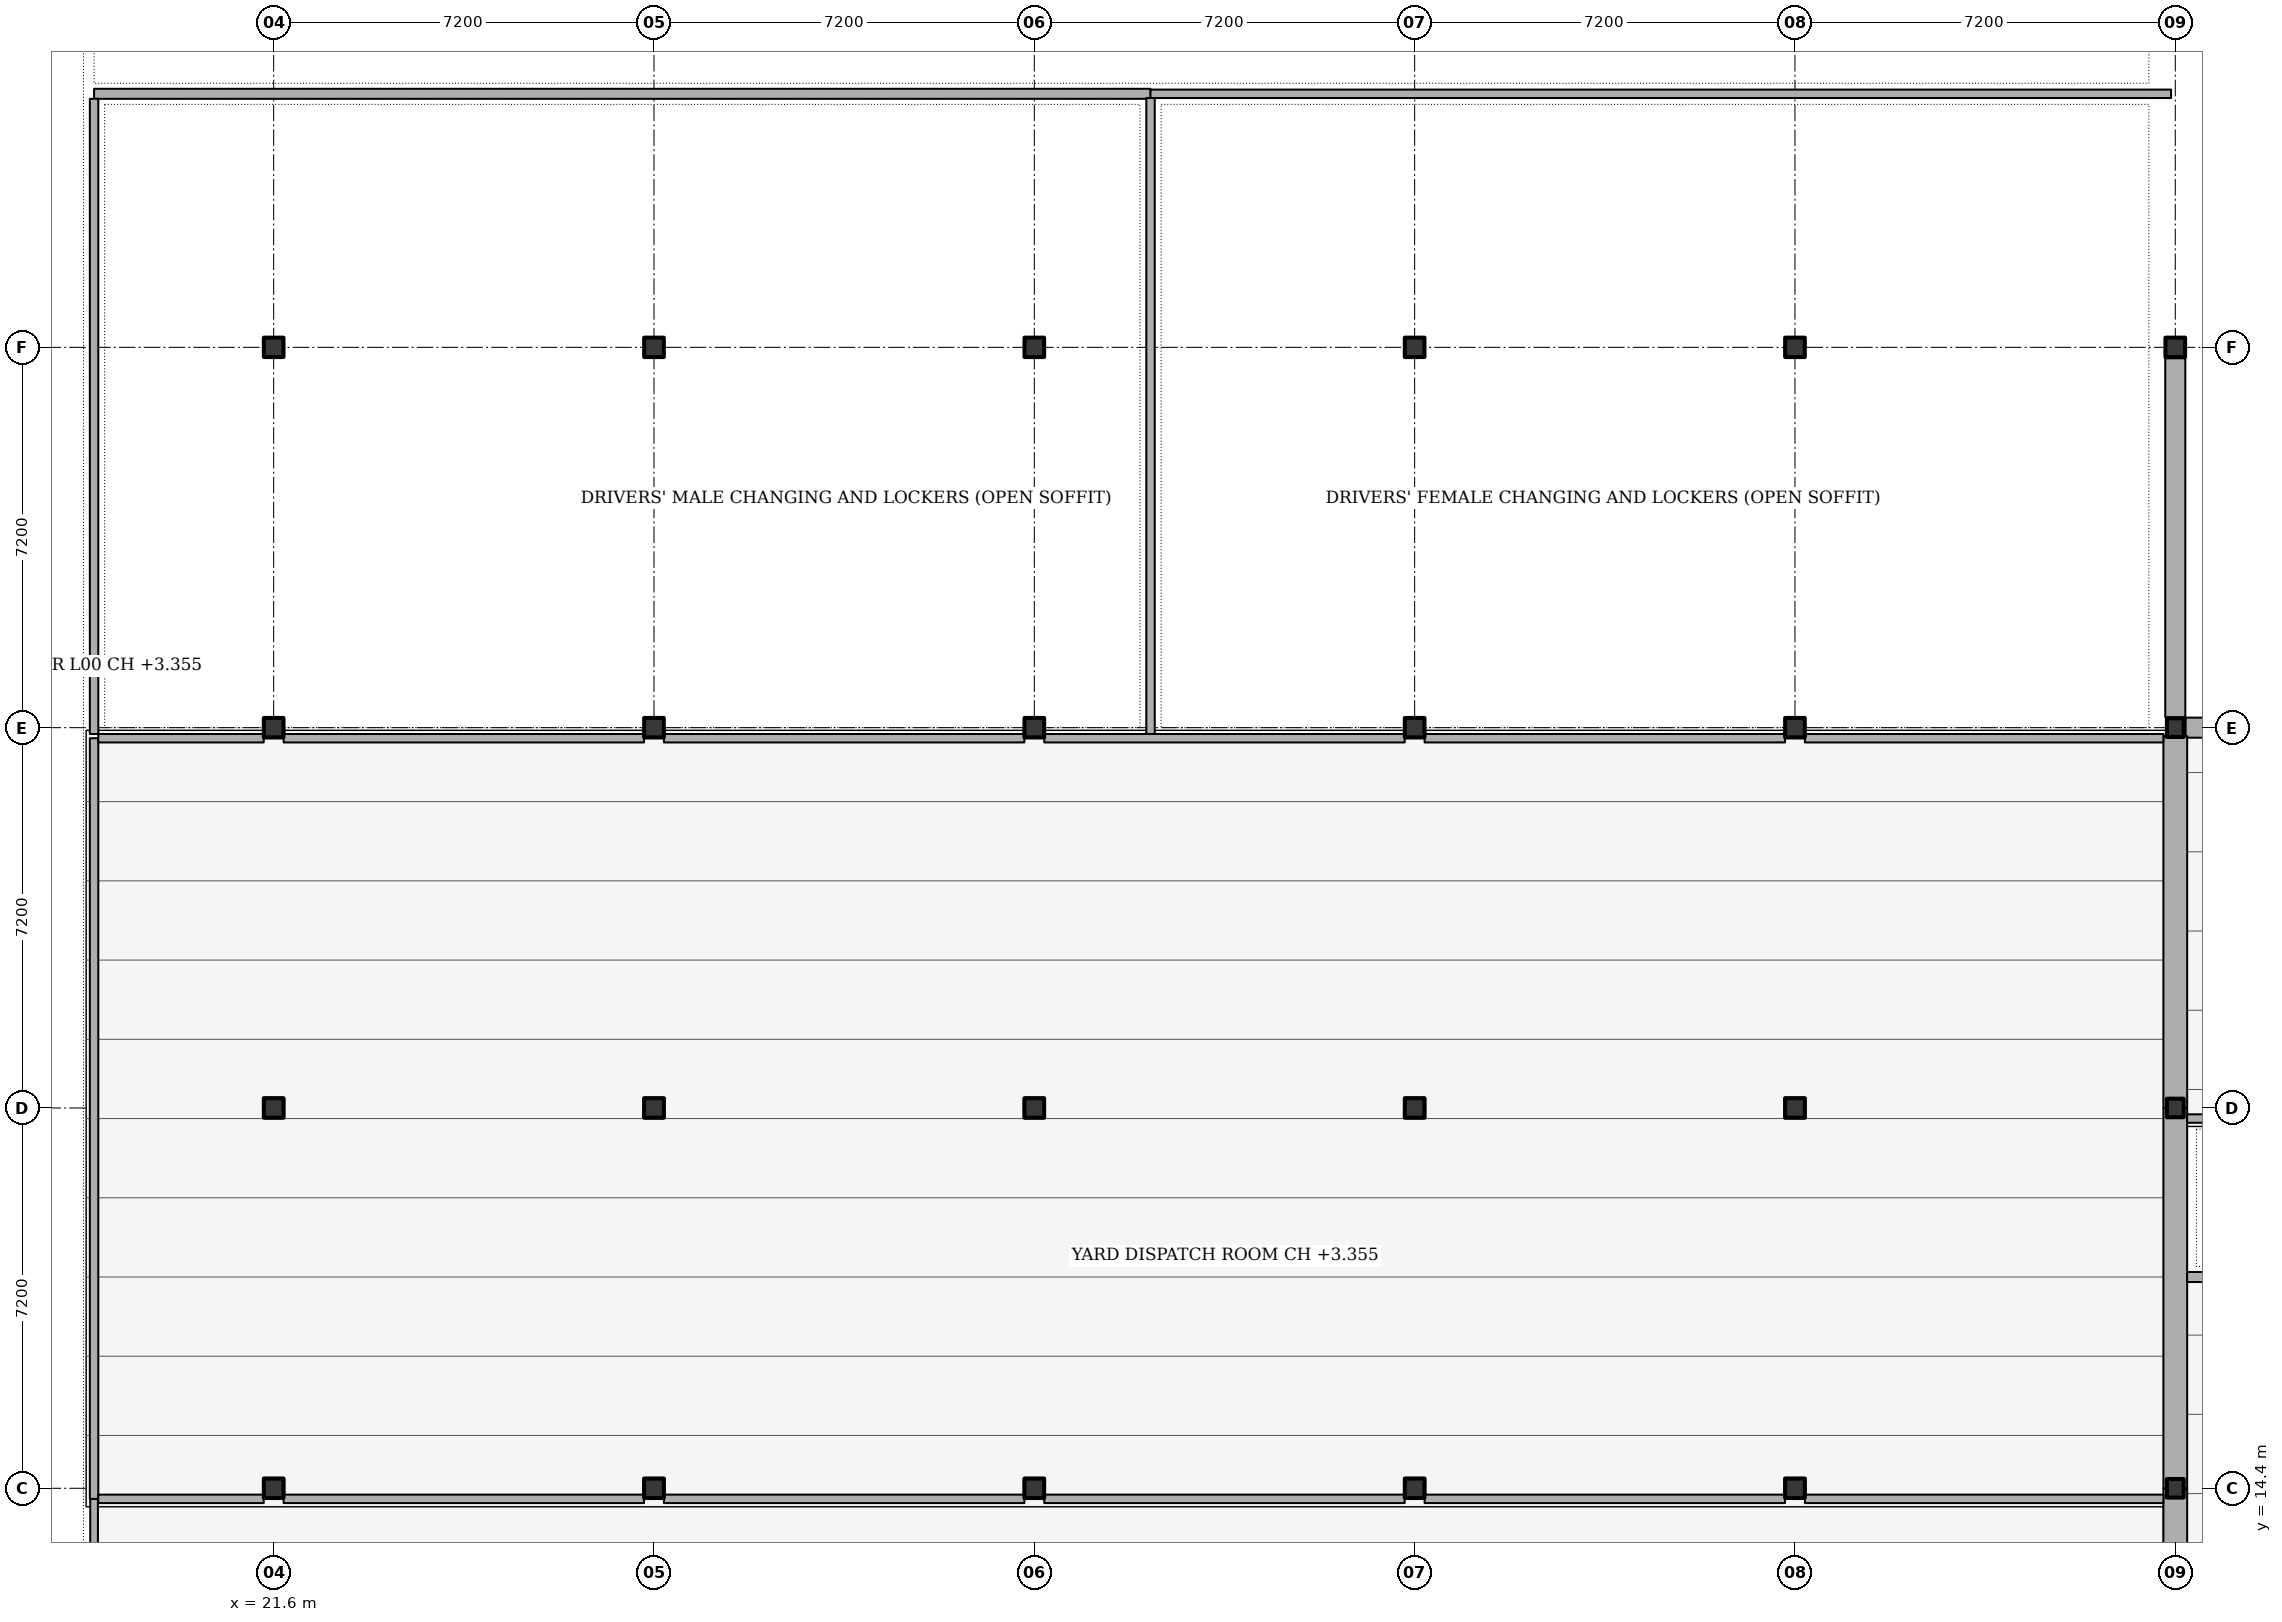
"""IFC4 building model, lengths in metres.
Left out: names, types, materials, properties, quantities, classifications, styles, units other than length and angle.
Written with IfcOpenShell. Run it as: python <this file> out.ifc"""

import sys

from ifc_helpers import new_model, si_unit, direction, frame, frame_2d, origin, origin_2d, place, context, subcontext, project, spatial, rectangle, i_section, extrude, element, fill, save


model = new_model("IFC4")
c1 = context("Model", 3, precision=1e-05, world=origin(), true_north=direction((0.0, 1.0)))
c2 = subcontext(c1, "Body", "Model", "MODEL_VIEW")
j1 = project(units=[si_unit("LENGTHUNIT", "METRE"), si_unit("PLANEANGLEUNIT", "RADIAN")], contexts=[c1])
p1 = place(None, origin())
s1 = spatial("IfcSite", under=j1, at=p1, CompositionType="ELEMENT")
p2 = place(p1, origin())
s2 = spatial("IfcBuilding", under=s1, at=p2, CompositionType="ELEMENT")
p3 = place(p2, origin())
s3 = spatial("IfcBuildingStorey", under=s2, at=p3, CompositionType="ELEMENT", Elevation=0.0)
for number, where, z_axis, x_axis in (
    (1, (21.6, 14.4, -0.3), (0.0, 0.0, 1.0), (1.0, 0.0, 0.0)),
    (2, (21.6, 21.6, -0.3), (0.0, 0.0, 1.0), (1.0, 0.0, 0.0)),
    (3, (21.6, 28.8, -0.3), (0.0, 0.0, 1.0), (1.0, 0.0, 0.0)),
    (4, (21.6, 36.0, -0.3), (0.0, 0.0, 1.0), (1.0, 0.0, 0.0)),
    (5, (28.8, 14.4, -0.3), (0.0, 0.0, 1.0), (1.0, 0.0, 0.0)),
    (6, (28.8, 21.6, -0.3), (0.0, 0.0, 1.0), (1.0, 0.0, 0.0)),
    (7, (28.8, 28.8, -0.3), (0.0, 0.0, 1.0), (1.0, 0.0, 0.0)),
    (8, (28.8, 36.0, -0.3), (0.0, 0.0, 1.0), (1.0, 0.0, 0.0)),
    (9, (36.0, 14.4, -0.3), (0.0, 0.0, 1.0), (1.0, 0.0, 0.0)),
    (10, (36.0, 21.6, -0.3), (0.0, 0.0, 1.0), (1.0, 0.0, 0.0)),
    (11, (36.0, 28.8, -0.3), (0.0, 0.0, 1.0), (1.0, 0.0, 0.0)),
    (12, (36.0, 36.0, -0.3), (0.0, 0.0, 1.0), (1.0, 0.0, 0.0)),
    (13, (43.2, 14.4, -0.3), (0.0, 0.0, 1.0), (1.0, 0.0, 0.0)),
    (14, (43.2, 21.6, -0.3), (0.0, 0.0, 1.0), (1.0, 0.0, 0.0)),
    (15, (43.2, 28.8, -0.3), (0.0, 0.0, 1.0), (1.0, 0.0, 0.0)),
    (16, (43.2, 36.0, -0.3), (0.0, 0.0, 1.0), (1.0, 0.0, 0.0)),
    (17, (50.4, 14.4, -0.3), (0.0, 0.0, 1.0), (1.0, 0.0, 0.0)),
    (18, (50.4, 21.6, -0.3), (0.0, 0.0, 1.0), (1.0, 0.0, 0.0)),
    (19, (50.4, 28.8, -0.3), (0.0, 0.0, 1.0), (1.0, 0.0, 0.0)),
    (20, (50.4, 36.0, -0.3), (0.0, 0.0, 1.0), (1.0, 0.0, 0.0)),
):
    element("IfcColumn", number, at=place(p3, frame(where, z_axis=z_axis, x_axis=x_axis)), inside=s3, PredefinedType="COLUMN", context=c2, shape_type="SweptSolid", body=[
        extrude(i_section(OverallWidth=0.373, OverallDepth=0.368, WebThickness=0.014, FlangeThickness=0.024, FilletRadius=0.015, at=origin_2d()), origin(), (0.0, 0.0, 1.0), 5.7),
    ])
for number, where, z_axis, x_axis in (
    (21, (57.6, 14.4, -0.3), (0.0, 0.0, 1.0), (1.0, 0.0, 0.0)),
    (22, (57.6, 21.6, -0.3), (0.0, 0.0, 1.0), (1.0, 0.0, 0.0)),
    (23, (57.6, 28.8, -0.3), (0.0, 0.0, 1.0), (1.0, 0.0, 0.0)),
):
    element("IfcColumn", number, at=place(p3, frame(where, z_axis=z_axis, x_axis=x_axis)), inside=s3, PredefinedType="COLUMN", context=c2, shape_type="SweptSolid", body=[
        extrude(i_section(OverallWidth=0.318, OverallDepth=0.353, WebThickness=0.023, FlangeThickness=0.038, FilletRadius=0.015, at=origin_2d()), origin(), (0.0, 0.0, 1.0), 5.7),
    ])
p4 = place(p3, frame((57.6, 36.0, -0.3), z_axis=(0.0, 0.0, 1.0), x_axis=(1.0, 0.0, 0.0)))
e24 = element("IfcColumn", 24, at=p4, inside=s3, PredefinedType="COLUMN", context=c2, shape_type="SweptSolid", body=[
    extrude(i_section(OverallWidth=0.373, OverallDepth=0.368, WebThickness=0.014, FlangeThickness=0.024, FilletRadius=0.015, at=origin_2d()), origin(), (0.0, 0.0, 1.0), 5.7),
])
p5 = place(p3, frame((57.6, 35.794, 0.0), z_axis=(0.0, 0.0, 1.0), x_axis=(0.0, -1.0, 0.0)))
e25 = element("IfcWall", 25, at=p5, inside=s3, PredefinedType="SOLIDWALL", context=c2, shape_type="SweptSolid", body=[
    extrude(rectangle(XDim=6.798, YDim=0.38, at=frame_2d((3.399, 0.0))), origin(), (0.0, 0.0, 1.0), 4.594),
])
p6 = place(p5, frame((2.074, 0.0, 1.05)))
e26 = element("IfcOpeningElement", 26, at=p6, cuts=e25, PredefinedType="OPENING", context=c2, shape_type="SweptSolid", body=[
    extrude(rectangle(XDim=2.65, YDim=1.6, at=frame_2d((1.325, 0.8))), frame((0.0, 0.2, 0.0), z_axis=(0.0, -1.0, 0.0), x_axis=(1.0, 0.0, 0.0)), (0.0, 0.0, 1.0), 0.4),
])
p7 = place(p3, frame((57.796, 28.8, 0.0), z_axis=(0.0, 0.0, 1.0), x_axis=(1.0, 0.0, 0.0)))
e27 = element("IfcWall", 27, at=p7, inside=s3, PredefinedType="SOLIDWALL", context=c2, shape_type="SweptSolid", body=[
    extrude(rectangle(XDim=6.807, YDim=0.38, at=frame_2d((3.404, 0.0))), origin(), (0.0, 0.0, 1.0), 4.304),
])
p8 = place(p3, frame((57.6, 7.2, 0.0), z_axis=(0.0, 0.0, 1.0), x_axis=(0.0, 1.0, 0.0)))
e28 = element("IfcWall", 28, at=p8, inside=s3, PredefinedType="SOLIDWALL", context=c2, shape_type="SweptSolid", body=[
    extrude(rectangle(XDim=7.2, YDim=0.45, at=frame_2d((3.6, 0.0))), origin(), (0.0, 0.0, 1.0), 4.594),
])
p9 = place(p3, frame((57.6, 14.4, 0.0), z_axis=(0.0, 0.0, 1.0), x_axis=(0.0, 1.0, 0.0)))
e29 = element("IfcWall", 29, at=p9, inside=s3, PredefinedType="SOLIDWALL", context=c2, shape_type="SweptSolid", body=[
    extrude(rectangle(XDim=7.2, YDim=0.45, at=frame_2d((3.6, 0.0))), origin(), (0.0, 0.0, 1.0), 4.594),
])
p10 = place(p9, frame((4.8, 0.0, 0.0)))
e30 = element("IfcOpeningElement", 30, at=p10, cuts=e29, PredefinedType="OPENING", context=c2, shape_type="SweptSolid", body=[
    extrude(rectangle(XDim=1.4, YDim=2.15, at=frame_2d((0.7, 1.075))), frame((0.0, 0.235, 0.0), z_axis=(0.0, -1.0, 0.0), x_axis=(1.0, 0.0, 0.0)), (0.0, 0.0, 1.0), 0.47),
])
p11 = place(p3, frame((57.6, 21.6, 0.0), z_axis=(0.0, 0.0, 1.0), x_axis=(0.0, 1.0, 0.0)))
e31 = element("IfcWall", 31, at=p11, inside=s3, PredefinedType="SOLIDWALL", context=c2, shape_type="SweptSolid", body=[
    extrude(rectangle(XDim=7.041, YDim=0.45, at=frame_2d((3.521, 0.0))), origin(), (0.0, 0.0, 1.0), 4.594),
])
p12 = place(p3, frame((57.825, 18.4, 0.0), z_axis=(0.0, 0.0, 1.0), x_axis=(1.0, 0.0, 0.0)))
e32 = element("IfcWall", 32, at=p12, inside=s3, PredefinedType="PARTITIONING", context=c2, shape_type="SweptSolid", body=[
    extrude(rectangle(XDim=28.375, YDim=0.19, at=frame_2d((14.188, 0.0))), origin(), (0.0, 0.0, 1.0), 3.55),
])
p13 = place(p12, frame((10.105, 0.0, 0.0)))
e33 = element("IfcOpeningElement", 33, at=p13, cuts=e32, PredefinedType="OPENING", context=c2, shape_type="SweptSolid", body=[
    extrude(rectangle(XDim=1.6, YDim=2.2, at=frame_2d((0.8, 1.1))), frame((0.0, 0.105, 0.0), z_axis=(0.0, -1.0, 0.0), x_axis=(1.0, 0.0, 0.0)), (0.0, 0.0, 1.0), 0.21),
])
p14 = place(p3, frame((57.825, 21.4, 0.0), z_axis=(0.0, 0.0, 1.0), x_axis=(1.0, 0.0, 0.0)))
e34 = element("IfcWall", 34, at=p14, inside=s3, PredefinedType="PARTITIONING", context=c2, shape_type="SweptSolid", body=[
    extrude(rectangle(XDim=6.814, YDim=0.16, at=frame_2d((3.407, 0.0))), origin(), (0.0, 0.0, 1.0), 3.55),
])
p15 = place(p3, frame((18.2, 0.08, 0.0), z_axis=(0.0, 0.0, 1.0), x_axis=(0.0, 1.0, 0.0)))
e35 = element("IfcWall", 35, at=p15, inside=s3, PredefinedType="PARTITIONING", context=c2, shape_type="SweptSolid", body=[
    extrude(rectangle(XDim=14.12, YDim=0.145, at=frame_2d((7.06, 0.0))), origin(), (0.0, 0.0, 1.0), 3.55),
])
p16 = place(p15, frame((10.84, 0.0, 0.0)))
e36 = element("IfcOpeningElement", 36, at=p16, cuts=e35, PredefinedType="OPENING", context=c2, shape_type="SweptSolid", body=[
    extrude(rectangle(XDim=1.22, YDim=2.16, at=frame_2d((0.61, 1.08))), frame((0.0, 0.083, 0.0), z_axis=(0.0, -1.0, 0.0), x_axis=(1.0, 0.0, 0.0)), (0.0, 0.0, 1.0), 0.165),
])
p17 = place(p3, frame((18.2, 14.2, 0.0), z_axis=(0.0, 0.0, 1.0), x_axis=(0.0, 1.0, 0.0)))
e37 = element("IfcWall", 37, at=p17, inside=s3, PredefinedType="PARTITIONING", context=c2, shape_type="SweptSolid", body=[
    extrude(rectangle(XDim=14.4, YDim=0.16, at=frame_2d((7.2, 0.0))), origin(), (0.0, 0.0, 1.0), 3.55),
])
p18 = place(p17, frame((3.41, 0.0, 0.0)))
e38 = element("IfcOpeningElement", 38, at=p18, cuts=e37, PredefinedType="OPENING", context=c2, shape_type="SweptSolid", body=[
    extrude(rectangle(XDim=1.4, YDim=2.15, at=frame_2d((0.7, 1.075))), frame((0.0, 0.09, 0.0), z_axis=(0.0, -1.0, 0.0), x_axis=(1.0, 0.0, 0.0)), (0.0, 0.0, 1.0), 0.18),
])
p19 = place(p3, frame((18.2, 40.8, 0.0), z_axis=(0.0, 0.0, 1.0), x_axis=(1.0, 0.0, 0.0)))
e39 = element("IfcWall", 39, at=p19, inside=s3, PredefinedType="PARTITIONING", context=c2, shape_type="SweptSolid", body=[
    extrude(rectangle(XDim=20.0, YDim=0.19, at=frame_2d((10.0, 0.0))), origin(), (0.0, 0.0, 1.0), 3.55),
])
p20 = place(p19, frame((13.7, 0.0, 0.0)))
e40 = element("IfcOpeningElement", 40, at=p20, cuts=e39, PredefinedType="OPENING", context=c2, shape_type="SweptSolid", body=[
    extrude(rectangle(XDim=1.52, YDim=2.06, at=frame_2d((0.76, 1.03))), frame((0.0, 0.105, 0.0), z_axis=(0.0, -1.0, 0.0), x_axis=(1.0, 0.0, 0.0)), (0.0, 0.0, 1.0), 0.21),
])
p21 = place(p3, frame((38.2, 40.8, 0.0), z_axis=(0.0, 0.0, 1.0), x_axis=(1.0, 0.0, 0.0)))
e41 = element("IfcWall", 41, at=p21, inside=s3, PredefinedType="PARTITIONING", context=c2, shape_type="SweptSolid", body=[
    extrude(rectangle(XDim=19.32, YDim=0.16, at=frame_2d((9.66, 0.0))), origin(), (0.0, 0.0, 1.0), 3.55),
])
p22 = place(p21, frame((15.09, 0.0, 0.0)))
e42 = element("IfcOpeningElement", 42, at=p22, cuts=e41, PredefinedType="OPENING", context=c2, shape_type="SweptSolid", body=[
    extrude(rectangle(XDim=1.58, YDim=2.08, at=frame_2d((0.79, 1.04))), frame((0.0, 0.09, 0.0), z_axis=(0.0, -1.0, 0.0), x_axis=(1.0, 0.0, 0.0)), (0.0, 0.0, 1.0), 0.18),
])
p23 = place(p3, frame((18.28, 14.2, 0.0), z_axis=(0.0, 0.0, 1.0), x_axis=(1.0, 0.0, 0.0)))
e43 = element("IfcWall", 43, at=p23, inside=s3, PredefinedType="PARTITIONING", context=c2, shape_type="SweptSolid", body=[
    extrude(rectangle(XDim=3.132, YDim=0.16, at=frame_2d((1.566, 0.0))), origin(), (0.0, 0.0, 1.0), 3.55),
])
for number, where, z_axis, x_axis in (
    (44, (21.788, 14.2, 0.0), (0.0, 0.0, 1.0), (1.0, 0.0, 0.0)),
    (45, (28.988, 14.2, 0.0), (0.0, 0.0, 1.0), (1.0, 0.0, 0.0)),
    (46, (36.188, 14.2, 0.0), (0.0, 0.0, 1.0), (1.0, 0.0, 0.0)),
    (47, (43.388, 14.2, 0.0), (0.0, 0.0, 1.0), (1.0, 0.0, 0.0)),
):
    element("IfcWall", number, at=place(p3, frame(where, z_axis=z_axis, x_axis=x_axis)), inside=s3, PredefinedType="PARTITIONING", context=c2, shape_type="SweptSolid", body=[
        extrude(rectangle(XDim=6.824, YDim=0.16, at=frame_2d((3.412, 0.0))), origin(), (0.0, 0.0, 1.0), 3.55),
    ])
p24 = place(p3, frame((50.588, 14.2, 0.0), z_axis=(0.0, 0.0, 1.0), x_axis=(1.0, 0.0, 0.0)))
e48 = element("IfcWall", 48, at=p24, inside=s3, PredefinedType="PARTITIONING", context=c2, shape_type="SweptSolid", body=[
    extrude(rectangle(XDim=6.787, YDim=0.16, at=frame_2d((3.394, 0.0))), origin(), (0.0, 0.0, 1.0), 3.55),
])
p25 = place(p3, frame((18.28, 28.6, 0.0), z_axis=(0.0, 0.0, 1.0), x_axis=(1.0, 0.0, 0.0)))
e49 = element("IfcWall", 49, at=p25, inside=s3, PredefinedType="PARTITIONING", context=c2, shape_type="SweptSolid", body=[
    extrude(rectangle(XDim=3.132, YDim=0.16, at=frame_2d((1.566, 0.0))), origin(), (0.0, 0.0, 1.0), 3.55),
])
for number, where, z_axis, x_axis in (
    (50, (21.788, 28.6, 0.0), (0.0, 0.0, 1.0), (1.0, 0.0, 0.0)),
    (51, (28.988, 28.6, 0.0), (0.0, 0.0, 1.0), (1.0, 0.0, 0.0)),
    (52, (36.188, 28.6, 0.0), (0.0, 0.0, 1.0), (1.0, 0.0, 0.0)),
    (53, (43.388, 28.6, 0.0), (0.0, 0.0, 1.0), (1.0, 0.0, 0.0)),
):
    element("IfcWall", number, at=place(p3, frame(where, z_axis=z_axis, x_axis=x_axis)), inside=s3, PredefinedType="PARTITIONING", context=c2, shape_type="SweptSolid", body=[
        extrude(rectangle(XDim=6.824, YDim=0.16, at=frame_2d((3.412, 0.0))), origin(), (0.0, 0.0, 1.0), 3.55),
    ])
p26 = place(p3, frame((50.588, 28.6, 0.0), z_axis=(0.0, 0.0, 1.0), x_axis=(1.0, 0.0, 0.0)))
e54 = element("IfcWall", 54, at=p26, inside=s3, PredefinedType="PARTITIONING", context=c2, shape_type="SweptSolid", body=[
    extrude(rectangle(XDim=6.787, YDim=0.16, at=frame_2d((3.394, 0.0))), origin(), (0.0, 0.0, 1.0), 3.55),
])
p27 = place(p3, frame((18.2, 28.68, 0.0), z_axis=(0.0, 0.0, 1.0), x_axis=(0.0, 1.0, 0.0)))
e55 = element("IfcWall", 55, at=p27, inside=s3, PredefinedType="PARTITIONING", context=c2, shape_type="SweptSolid", body=[
    extrude(rectangle(XDim=12.025, YDim=0.16, at=frame_2d((6.013, 0.0))), origin(), (0.0, 0.0, 1.0), 3.55),
])
p28 = place(p3, frame((38.2, 28.68, 0.0), z_axis=(0.0, 0.0, 1.0), x_axis=(0.0, 1.0, 0.0)))
e56 = element("IfcWall", 56, at=p28, inside=s3, PredefinedType="PARTITIONING", context=c2, shape_type="SweptSolid", body=[
    extrude(rectangle(XDim=12.04, YDim=0.16, at=frame_2d((6.02, 0.0))), origin(), (0.0, 0.0, 1.0), 3.55),
])
p29 = place(p6, origin())
e57 = element("IfcWindow", 57, at=p29, inside=s3, PartitioningType="SINGLE_PANEL", PredefinedType="WINDOW", context=c2, shape_type="SweptSolid", body=[
    extrude(rectangle(XDim=2.65, YDim=1.6, at=frame_2d((1.325, 0.8))), frame((0.0, 0.03, 0.0), z_axis=(0.0, -1.0, 0.0), x_axis=(1.0, 0.0, 0.0)), (0.0, 0.0, 1.0), 0.06),
])
fill(e26, e57)
p30 = place(p10, origin())
e58 = element("IfcDoor", 58, at=p30, inside=s3, OperationType="SINGLE_SWING_LEFT", PredefinedType="DOOR", context=c2, shape_type="SweptSolid", body=[
    extrude(rectangle(XDim=1.4, YDim=2.15, at=frame_2d((0.7, 1.075))), frame((0.0, 0.025, 0.0), z_axis=(0.0, -1.0, 0.0), x_axis=(1.0, 0.0, 0.0)), (0.0, 0.0, 1.0), 0.05),
])
fill(e30, e58)
p31 = place(p18, origin())
e59 = element("IfcDoor", 59, at=p31, inside=s3, OperationType="SINGLE_SWING_LEFT", PredefinedType="DOOR", context=c2, shape_type="SweptSolid", body=[
    extrude(rectangle(XDim=1.4, YDim=2.15, at=frame_2d((0.7, 1.075))), frame((0.0, 0.025, 0.0), z_axis=(0.0, -1.0, 0.0), x_axis=(1.0, 0.0, 0.0)), (0.0, 0.0, 1.0), 0.05),
])
fill(e38, e59)
p32 = place(p20, origin())
e60 = element("IfcDoor", 60, at=p32, inside=s3, OperationType="SINGLE_SWING_LEFT", PredefinedType="DOOR", context=c2, shape_type="SweptSolid", body=[
    extrude(rectangle(XDim=1.52, YDim=2.06, at=frame_2d((0.76, 1.03))), frame((0.0, 0.025, 0.0), z_axis=(0.0, -1.0, 0.0), x_axis=(1.0, 0.0, 0.0)), (0.0, 0.0, 1.0), 0.05),
])
fill(e40, e60)
p33 = place(p22, origin())
e61 = element("IfcDoor", 61, at=p33, inside=s3, OperationType="SINGLE_SWING_RIGHT", PredefinedType="DOOR", context=c2, shape_type="SweptSolid", body=[
    extrude(rectangle(XDim=1.58, YDim=2.08, at=frame_2d((0.79, 1.04))), frame((0.0, 0.025, 0.0), z_axis=(0.0, -1.0, 0.0), x_axis=(1.0, 0.0, 0.0)), (0.0, 0.0, 1.0), 0.05),
])
fill(e42, e61)
save(model, sys.argv[1])
